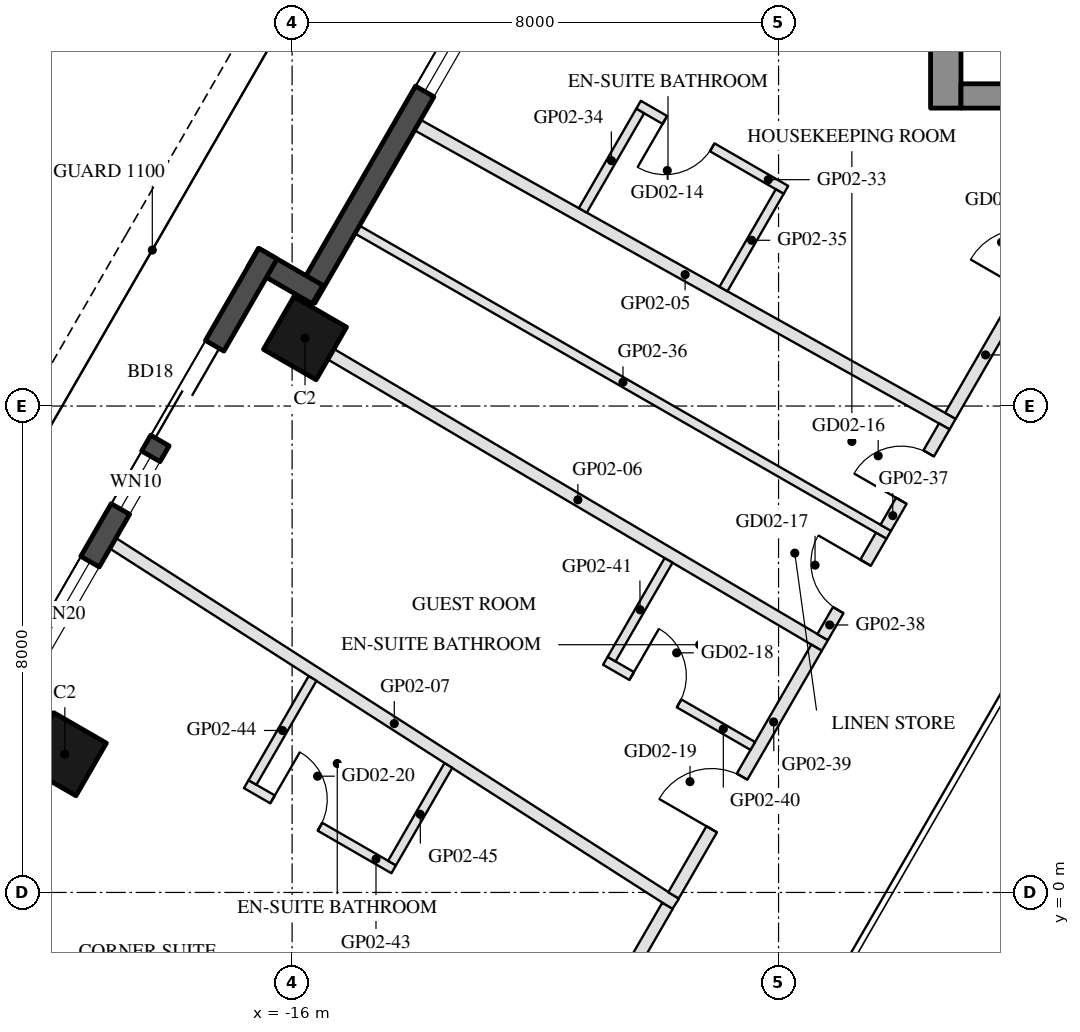
"""IFC4 building model, lengths in metres.
Left out: names, types, materials, properties, quantities, classifications, styles, units other than length and angle.
Written with IfcOpenShell. Run it as: python <this file> out.ifc"""

import sys

from ifc_helpers import new_model, si_unit, direction, frame, frame_2d, origin, origin_2d, place, context, subcontext, project, spatial, rectangle, hollow_rectangle, extrude, element, fill, save


model = new_model("IFC4")
c1 = context("Model", 3, precision=1e-05, world=origin(), true_north=direction((0.0, 1.0)))
c2 = subcontext(c1, "Body", "Model", "MODEL_VIEW")
j1 = project(units=[si_unit("LENGTHUNIT", "METRE"), si_unit("PLANEANGLEUNIT", "RADIAN")], contexts=[c1])
p1 = place(None, origin())
s1 = spatial("IfcSite", under=j1, at=p1, CompositionType="ELEMENT")
p2 = place(p1, origin())
s2 = spatial("IfcBuilding", under=s1, at=p2, CompositionType="ELEMENT")
p3 = place(p2, frame((0.0, 0.0, 53.9)))
s3 = spatial("IfcBuildingStorey", under=s2, at=p3, CompositionType="ELEMENT", Elevation=53.9)
for number, where, z_axis, x_axis in (
    (1, (-15.788, 9.115, 0.0), (0.0, 0.0, 1.0), (0.5, 0.866, 0.0)),
    (2, (-19.738, 2.273, 0.0), (0.0, 0.0, 1.0), (0.5, 0.866, 0.0)),
):
    element("IfcColumn", number, at=place(p3, frame(where, z_axis=z_axis, x_axis=x_axis)), inside=s3, PredefinedType="COLUMN", context=c2, shape_type="SweptSolid", body=[
        extrude(hollow_rectangle(XDim=1.0, YDim=1.0, WallThickness=0.045, at=origin_2d()), origin(), (0.0, 0.0, 1.0), 3.7),
    ])
p4 = place(p3, frame((-12.409, 15.617, 0.0), z_axis=(0.0, 0.0, 1.0), x_axis=(-0.500003597184, -0.866023326939, 0.0)))
e3 = element("IfcWall", 3, at=p4, inside=s3, PredefinedType="SOLIDWALL", context=c2, shape_type="SweptSolid", body=[
    extrude(rectangle(XDim=6.74, YDim=0.35, at=frame_2d((3.37, 0.0))), origin(), (0.0, 0.0, 1.0), 3.55),
])
p5 = place(p4, frame((0.32, 0.0, 0.3)))
e4 = element("IfcOpeningElement", 4, at=p5, cuts=e3, PredefinedType="OPENING", context=c2, shape_type="SweptSolid", body=[
    extrude(rectangle(XDim=2.5, YDim=2.65, at=frame_2d((1.25, 1.325))), frame((0.0, 0.185, 0.0), z_axis=(0.0, -1.0, 0.0), x_axis=(1.0, 0.0, 0.0)), (0.0, 0.0, 1.0), 0.37),
])
p6 = place(p3, frame((-15.581, 9.833, 0.0), z_axis=(0.0, 0.0, 1.0), x_axis=(-0.866055662726, 0.499947586314, 0.0)))
e5 = element("IfcWall", 5, at=p6, inside=s3, PredefinedType="SOLIDWALL", context=c2, shape_type="SweptSolid", body=[
    extrude(rectangle(XDim=1.22, YDim=0.35, at=frame_2d((0.61, 0.0))), origin(), (0.0, 0.0, 1.0), 3.55),
])
p7 = place(p3, frame((-16.398, 10.507, 0.0), z_axis=(0.0, 0.0, 1.0), x_axis=(-0.499999142773, -0.866025898704, 0.0)))
e6 = element("IfcWall", 6, at=p7, inside=s3, PredefinedType="SOLIDWALL", context=c2, shape_type="SweptSolid", body=[
    extrude(rectangle(XDim=9.7, YDim=0.35, at=frame_2d((4.85, 0.0))), origin(), (0.0, 0.0, 1.0), 3.55),
])
p8 = place(p7, frame((1.75, 0.0, 0.0)))
e7 = element("IfcOpeningElement", 7, at=p8, cuts=e6, PredefinedType="OPENING", context=c2, shape_type="SweptSolid", body=[
    extrude(rectangle(XDim=1.8, YDim=2.4, at=frame_2d((0.9, 1.2))), frame((0.0, 0.185, 0.0), z_axis=(0.0, -1.0, 0.0), x_axis=(1.0, 0.0, 0.0)), (0.0, 0.0, 1.0), 0.37),
])
p9 = place(p7, frame((3.85, 0.0, 0.3)))
e8 = element("IfcOpeningElement", 8, at=p9, cuts=e6, PredefinedType="OPENING", context=c2, shape_type="SweptSolid", body=[
    extrude(rectangle(XDim=1.0, YDim=2.65, at=frame_2d((0.5, 1.325))), frame((0.0, 0.185, 0.0), z_axis=(0.0, -1.0, 0.0), x_axis=(1.0, 0.0, 0.0)), (0.0, 0.0, 1.0), 0.37),
])
p10 = place(p7, frame((5.85, 0.0, 0.3)))
e9 = element("IfcOpeningElement", 9, at=p10, cuts=e6, PredefinedType="OPENING", context=c2, shape_type="SweptSolid", body=[
    extrude(rectangle(XDim=2.0, YDim=2.65, at=frame_2d((1.0, 1.325))), frame((0.0, 0.185, 0.0), z_axis=(0.0, -1.0, 0.0), x_axis=(1.0, 0.0, 0.0)), (0.0, 0.0, 1.0), 0.37),
])
p11 = place(p3, frame((-5.25, 12.9, 0.0), z_axis=(0.0, 0.0, 1.0), x_axis=(0.0, 1.0, 0.0)))
e10 = element("IfcWall", 10, at=p11, inside=s3, PredefinedType="SHEAR", context=c2, shape_type="SweptSolid", body=[
    extrude(rectangle(XDim=14.837, YDim=0.5, at=frame_2d((7.418, 0.0))), origin(), (0.0, 0.0, 1.0), 3.5),
])
p12 = place(p3, frame((5.0, 13.1, 0.0), z_axis=(0.0, 0.0, 1.0), x_axis=(-1.0, 0.0, 0.0)))
e11 = element("IfcWall", 11, at=p12, inside=s3, PredefinedType="SHEAR", context=c2, shape_type="SweptSolid", body=[
    extrude(rectangle(XDim=10.0, YDim=0.4, at=frame_2d((5.0, 0.0))), origin(), (0.0, 0.0, 1.0), 3.5),
])
p13 = place(p12, frame((3.55, 0.0, 0.0)))
e12 = element("IfcOpeningElement", 12, at=p13, cuts=e11, PredefinedType="OPENING", context=c2, shape_type="SweptSolid", body=[
    extrude(rectangle(XDim=1.1, YDim=2.1, at=frame_2d((0.55, 1.05))), frame((0.0, 0.21, 0.0), z_axis=(0.0, -1.0, 0.0), x_axis=(1.0, 0.0, 0.0)), (0.0, 0.0, 1.0), 0.42),
])
p14 = place(p12, frame((5.85, 0.0, 0.0)))
e13 = element("IfcOpeningElement", 13, at=p14, cuts=e11, PredefinedType="OPENING", context=c2, shape_type="SweptSolid", body=[
    extrude(rectangle(XDim=1.4, YDim=2.1, at=frame_2d((0.7, 1.05))), frame((0.0, 0.21, 0.0), z_axis=(0.0, -1.0, 0.0), x_axis=(1.0, 0.0, 0.0)), (0.0, 0.0, 1.0), 0.42),
])
p15 = place(p3, frame((-13.936, 12.622, 0.0), z_axis=(0.0, 0.0, 1.0), x_axis=(0.872898889426, -0.487901146585, 0.0)))
e14 = element("IfcWall", 14, at=p15, inside=s3, PredefinedType="PARTITIONING", context=c2, shape_type="SweptSolid", body=[
    extrude(rectangle(XDim=10.081, YDim=0.2, at=frame_2d((5.041, 0.0))), origin(), (0.0, 0.0, 1.0), 2.95),
])
p16 = place(p3, frame((-15.362, 8.853, 0.0), z_axis=(0.0, 0.0, 1.0), x_axis=(0.861347313363, -0.508016540835, 0.0)))
e15 = element("IfcWall", 15, at=p16, inside=s3, PredefinedType="PARTITIONING", context=c2, shape_type="SweptSolid", body=[
    extrude(rectangle(XDim=9.43, YDim=0.2, at=frame_2d((4.715, 0.0))), origin(), (0.0, 0.0, 1.0), 2.95),
])
p17 = place(p3, frame((-18.947, 5.743, 0.0), z_axis=(0.0, 0.0, 1.0), x_axis=(0.84192674528, -0.539591841657, 0.0)))
e16 = element("IfcWall", 16, at=p17, inside=s3, PredefinedType="PARTITIONING", context=c2, shape_type="SweptSolid", body=[
    extrude(rectangle(XDim=10.992, YDim=0.2, at=frame_2d((5.496, 0.0))), origin(), (0.0, 0.0, 1.0), 2.96),
])
p18 = place(p3, frame((-5.174, 7.838, 0.0), z_axis=(0.0, 0.0, 1.0), x_axis=(0.499973220989, 0.866040864101, 0.0)))
e17 = element("IfcWall", 17, at=p18, inside=s3, PredefinedType="PARTITIONING", context=c2, shape_type="SweptSolid", body=[
    extrude(rectangle(XDim=5.787, YDim=0.2, at=frame_2d((2.894, 0.0))), origin(), (0.0, 0.0, 1.0), 2.95),
])
p19 = place(p18, frame((2.393, 0.0, 0.0)))
e18 = element("IfcOpeningElement", 18, at=p19, cuts=e17, PredefinedType="OPENING", context=c2, shape_type="SweptSolid", body=[
    extrude(rectangle(XDim=1.0, YDim=2.1, at=frame_2d((0.5, 1.05))), frame((0.0, 0.11, 0.0), z_axis=(0.0, -1.0, 0.0), x_axis=(1.0, 0.0, 0.0)), (0.0, 0.0, 1.0), 0.22),
])
p20 = place(p3, frame((-7.878, 11.555, 0.0), z_axis=(0.0, 0.0, 1.0), x_axis=(-0.865996816683, 0.500049511043, 0.0)))
e19 = element("IfcWall", 19, at=p20, inside=s3, PredefinedType="PARTITIONING", context=c2, shape_type="SweptSolid", body=[
    extrude(rectangle(XDim=2.8, YDim=0.15, at=frame_2d((1.4, 0.0))), origin(), (0.0, 0.0, 1.0), 3.55),
])
p21 = place(p20, frame((1.4, 0.0, 0.0)))
e20 = element("IfcOpeningElement", 20, at=p21, cuts=e19, PredefinedType="OPENING", context=c2, shape_type="SweptSolid", body=[
    extrude(rectangle(XDim=0.9, YDim=2.1, at=frame_2d((0.45, 1.05))), frame((0.0, 0.085, 0.0), z_axis=(0.0, -1.0, 0.0), x_axis=(1.0, 0.0, 0.0)), (0.0, 0.0, 1.0), 0.17),
])
p22 = place(p3, frame((-10.275, 12.853, 0.0), z_axis=(0.0, 0.0, 1.0), x_axis=(-0.499950073403, -0.866054227, 0.0)))
e21 = element("IfcWall", 21, at=p22, inside=s3, PredefinedType="PARTITIONING", context=c2, shape_type="SweptSolid", body=[
    extrude(rectangle(XDim=1.888, YDim=0.15, at=frame_2d((0.944, 0.0))), origin(), (0.0, 0.0, 1.0), 3.55),
])
p23 = place(p3, frame((-7.98, 11.528, 0.0), z_axis=(0.0, 0.0, 1.0), x_axis=(-0.500011685716, -0.866018656928, 0.0)))
e22 = element("IfcWall", 22, at=p23, inside=s3, PredefinedType="PARTITIONING", context=c2, shape_type="SweptSolid", body=[
    extrude(rectangle(XDim=1.851, YDim=0.15, at=frame_2d((0.926, 0.0))), origin(), (0.0, 0.0, 1.0), 3.55),
])
p24 = place(p3, frame((-14.929, 10.902, 0.0), z_axis=(0.0, 0.0, 1.0), x_axis=(0.867191892367, -0.497974117614, 0.0)))
e23 = element("IfcWall", 23, at=p24, inside=s3, PredefinedType="PARTITIONING", context=c2, shape_type="SweptSolid", body=[
    extrude(rectangle(XDim=10.08, YDim=0.15, at=frame_2d((5.04, 0.0))), origin(), (0.0, 0.0, 1.0), 2.96),
])
p25 = place(p3, frame((-6.237, 5.997, 0.0), z_axis=(0.0, 0.0, 1.0), x_axis=(0.500051616692, 0.865995600822, 0.0)))
e24 = element("IfcWall", 24, at=p25, inside=s3, PredefinedType="PARTITIONING", context=c2, shape_type="SweptSolid", body=[
    extrude(rectangle(XDim=1.926, YDim=0.2, at=frame_2d((0.963, 0.0))), origin(), (0.0, 0.0, 1.0), 2.95),
])
p26 = place(p25, frame((0.513, 0.0, 0.0)))
e25 = element("IfcOpeningElement", 25, at=p26, cuts=e24, PredefinedType="OPENING", context=c2, shape_type="SweptSolid", body=[
    extrude(rectangle(XDim=0.9, YDim=2.1, at=frame_2d((0.45, 1.05))), frame((0.0, 0.11, 0.0), z_axis=(0.0, -1.0, 0.0), x_axis=(1.0, 0.0, 0.0)), (0.0, 0.0, 1.0), 0.22),
])
p27 = place(p3, frame((-7.275, 4.199, 0.0), z_axis=(0.0, 0.0, 1.0), x_axis=(0.500051616692, 0.865995600822, 0.0)))
e26 = element("IfcWall", 26, at=p27, inside=s3, PredefinedType="PARTITIONING", context=c2, shape_type="SweptSolid", body=[
    extrude(rectangle(XDim=1.926, YDim=0.2, at=frame_2d((0.963, 0.0))), origin(), (0.0, 0.0, 1.0), 2.95),
])
p28 = place(p27, frame((0.513, 0.0, 0.0)))
e27 = element("IfcOpeningElement", 27, at=p28, cuts=e26, PredefinedType="OPENING", context=c2, shape_type="SweptSolid", body=[
    extrude(rectangle(XDim=0.9, YDim=2.1, at=frame_2d((0.45, 1.05))), frame((0.0, 0.11, 0.0), z_axis=(0.0, -1.0, 0.0), x_axis=(1.0, 0.0, 0.0)), (0.0, 0.0, 1.0), 0.22),
])
p29 = place(p3, frame((-9.727, -0.047, 0.0), z_axis=(0.0, 0.0, 1.0), x_axis=(0.500019002036, 0.866014432676, 0.0)))
e28 = element("IfcWall", 28, at=p29, inside=s3, PredefinedType="PARTITIONING", context=c2, shape_type="SweptSolid", body=[
    extrude(rectangle(XDim=4.703, YDim=0.2, at=frame_2d((2.352, 0.0))), origin(), (0.0, 0.0, 1.0), 2.95),
])
p30 = place(p29, frame((1.254, 0.0, 0.0)))
e29 = element("IfcOpeningElement", 29, at=p30, cuts=e28, PredefinedType="OPENING", context=c2, shape_type="SweptSolid", body=[
    extrude(rectangle(XDim=1.0, YDim=2.1, at=frame_2d((0.5, 1.05))), frame((0.0, 0.11, 0.0), z_axis=(0.0, -1.0, 0.0), x_axis=(1.0, 0.0, 0.0)), (0.0, 0.0, 1.0), 0.22),
])
p31 = place(p3, frame((-10.849, 3.81, 0.0), z_axis=(0.0, 0.0, 1.0), x_axis=(0.866018616679, -0.500011755427, 0.0)))
e30 = element("IfcWall", 30, at=p31, inside=s3, PredefinedType="PARTITIONING", context=c2, shape_type="SweptSolid", body=[
    extrude(rectangle(XDim=2.8, YDim=0.15, at=frame_2d((1.4, 0.0))), origin(), (0.0, 0.0, 1.0), 3.55),
])
p32 = place(p31, frame((0.5, 0.0, 0.0)))
e31 = element("IfcOpeningElement", 31, at=p32, cuts=e30, PredefinedType="OPENING", context=c2, shape_type="SweptSolid", body=[
    extrude(rectangle(XDim=0.9, YDim=2.1, at=frame_2d((0.45, 1.05))), frame((0.0, 0.085, 0.0), z_axis=(0.0, -1.0, 0.0), x_axis=(1.0, 0.0, 0.0)), (0.0, 0.0, 1.0), 0.17),
])
p33 = place(p3, frame((-9.809, 5.461, 0.0), z_axis=(0.0, 0.0, 1.0), x_axis=(-0.499947857008, -0.866055506462, 0.0)))
e32 = element("IfcWall", 32, at=p33, inside=s3, PredefinedType="PARTITIONING", context=c2, shape_type="SweptSolid", body=[
    extrude(rectangle(XDim=1.875, YDim=0.15, at=frame_2d((0.938, 0.0))), origin(), (0.0, 0.0, 1.0), 3.55),
])
p34 = place(p3, frame((-12.269, -4.45, 0.0), z_axis=(0.0, 0.0, 1.0), x_axis=(0.500021044785, 0.866013253231, 0.0)))
e33 = element("IfcWall", 33, at=p34, inside=s3, PredefinedType="PARTITIONING", context=c2, shape_type="SweptSolid", body=[
    extrude(rectangle(XDim=4.884, YDim=0.2, at=frame_2d((2.442, 0.0))), origin(), (0.0, 0.0, 1.0), 2.95),
])
p35 = place(p34, frame((1.942, 0.0, 0.0)))
e34 = element("IfcOpeningElement", 34, at=p35, cuts=e33, PredefinedType="OPENING", context=c2, shape_type="SweptSolid", body=[
    extrude(rectangle(XDim=1.0, YDim=2.1, at=frame_2d((0.5, 1.05))), frame((0.0, 0.11, 0.0), z_axis=(0.0, -1.0, 0.0), x_axis=(1.0, 0.0, 0.0)), (0.0, 0.0, 1.0), 0.22),
])
p36 = place(p3, frame((-16.754, 1.781, 0.0), z_axis=(0.0, 0.0, 1.0), x_axis=(0.866056369097, -0.49994636267, 0.0)))
e35 = element("IfcWall", 35, at=p36, inside=s3, PredefinedType="PARTITIONING", context=c2, shape_type="SweptSolid", body=[
    extrude(rectangle(XDim=2.8, YDim=0.15, at=frame_2d((1.4, 0.0))), origin(), (0.0, 0.0, 1.0), 3.55),
])
p37 = place(p36, frame((0.5, 0.0, 0.0)))
e36 = element("IfcOpeningElement", 36, at=p37, cuts=e35, PredefinedType="OPENING", context=c2, shape_type="SweptSolid", body=[
    extrude(rectangle(XDim=0.9, YDim=2.1, at=frame_2d((0.45, 1.05))), frame((0.0, 0.085, 0.0), z_axis=(0.0, -1.0, 0.0), x_axis=(1.0, 0.0, 0.0)), (0.0, 0.0, 1.0), 0.17),
])
p38 = place(p3, frame((-15.664, 3.52, 0.0), z_axis=(0.0, 0.0, 1.0), x_axis=(-0.500018274647, -0.866014852655, 0.0)))
e37 = element("IfcWall", 37, at=p38, inside=s3, PredefinedType="PARTITIONING", context=c2, shape_type="SweptSolid", body=[
    extrude(rectangle(XDim=1.977, YDim=0.15, at=frame_2d((0.988, 0.0))), origin(), (0.0, 0.0, 1.0), 3.55),
])
p39 = place(p3, frame((-13.43, 2.088, 0.0), z_axis=(0.0, 0.0, 1.0), x_axis=(-0.499893495202, -0.866086885627, 0.0)))
e38 = element("IfcWall", 38, at=p39, inside=s3, PredefinedType="PARTITIONING", context=c2, shape_type="SweptSolid", body=[
    extrude(rectangle(XDim=1.854, YDim=0.15, at=frame_2d((0.927, 0.0))), origin(), (0.0, 0.0, 1.0), 3.55),
])
p40 = place(p5, origin())
e39 = element("IfcWindow", 39, at=p40, inside=s3, PartitioningType="SINGLE_PANEL", PredefinedType="WINDOW", context=c2, shape_type="SweptSolid", body=[
    extrude(rectangle(XDim=2.5, YDim=2.65, at=frame_2d((1.25, 1.325))), frame((0.0, 0.03, 0.0), z_axis=(0.0, -1.0, 0.0), x_axis=(1.0, 0.0, 0.0)), (0.0, 0.0, 1.0), 0.06),
])
fill(e4, e39)
p41 = place(p8, frame((1.8, 0.0, 0.0), z_axis=(0.0, 0.0, 1.0), x_axis=(-1.0, 0.0, 0.0)))
e40 = element("IfcDoor", 40, at=p41, inside=s3, OperationType="SLIDING_TO_LEFT", PredefinedType="DOOR", context=c2, shape_type="SweptSolid", body=[
    extrude(rectangle(XDim=1.8, YDim=2.4, at=frame_2d((0.9, 1.2))), frame((0.0, 0.025, 0.0), z_axis=(0.0, -1.0, 0.0), x_axis=(1.0, 0.0, 0.0)), (0.0, 0.0, 1.0), 0.05),
])
fill(e7, e40)
p42 = place(p9, origin())
e41 = element("IfcWindow", 41, at=p42, inside=s3, PartitioningType="SINGLE_PANEL", PredefinedType="WINDOW", context=c2, shape_type="SweptSolid", body=[
    extrude(rectangle(XDim=1.0, YDim=2.65, at=frame_2d((0.5, 1.325))), frame((0.0, 0.03, 0.0), z_axis=(0.0, -1.0, 0.0), x_axis=(1.0, 0.0, 0.0)), (0.0, 0.0, 1.0), 0.06),
])
fill(e8, e41)
p43 = place(p10, origin())
e42 = element("IfcWindow", 42, at=p43, inside=s3, PartitioningType="SINGLE_PANEL", PredefinedType="WINDOW", context=c2, shape_type="SweptSolid", body=[
    extrude(rectangle(XDim=2.0, YDim=2.65, at=frame_2d((1.0, 1.325))), frame((0.0, 0.03, 0.0), z_axis=(0.0, -1.0, 0.0), x_axis=(1.0, 0.0, 0.0)), (0.0, 0.0, 1.0), 0.06),
])
fill(e9, e42)
p44 = place(p21, origin())
e43 = element("IfcDoor", 43, at=p44, inside=s3, OperationType="SINGLE_SWING_RIGHT", PredefinedType="DOOR", context=c2, shape_type="SweptSolid", body=[
    extrude(rectangle(XDim=0.9, YDim=2.1, at=frame_2d((0.45, 1.05))), frame((0.0, 0.025, 0.0), z_axis=(0.0, -1.0, 0.0), x_axis=(1.0, 0.0, 0.0)), (0.0, 0.0, 1.0), 0.05),
])
fill(e20, e43)
p45 = place(p26, origin())
e44 = element("IfcDoor", 44, at=p45, inside=s3, OperationType="SINGLE_SWING_LEFT", PredefinedType="DOOR", context=c2, shape_type="SweptSolid", body=[
    extrude(rectangle(XDim=0.9, YDim=2.1, at=frame_2d((0.45, 1.05))), frame((0.0, 0.025, 0.0), z_axis=(0.0, -1.0, 0.0), x_axis=(1.0, 0.0, 0.0)), (0.0, 0.0, 1.0), 0.05),
])
fill(e25, e44)
p46 = place(p28, origin())
e45 = element("IfcDoor", 45, at=p46, inside=s3, OperationType="SINGLE_SWING_RIGHT", PredefinedType="DOOR", context=c2, shape_type="SweptSolid", body=[
    extrude(rectangle(XDim=0.9, YDim=2.1, at=frame_2d((0.45, 1.05))), frame((0.0, 0.025, 0.0), z_axis=(0.0, -1.0, 0.0), x_axis=(1.0, 0.0, 0.0)), (0.0, 0.0, 1.0), 0.05),
])
fill(e27, e45)
p47 = place(p32, origin())
e46 = element("IfcDoor", 46, at=p47, inside=s3, OperationType="SINGLE_SWING_LEFT", PredefinedType="DOOR", context=c2, shape_type="SweptSolid", body=[
    extrude(rectangle(XDim=0.9, YDim=2.1, at=frame_2d((0.45, 1.05))), frame((0.0, 0.025, 0.0), z_axis=(0.0, -1.0, 0.0), x_axis=(1.0, 0.0, 0.0)), (0.0, 0.0, 1.0), 0.05),
])
fill(e31, e46)
p48 = place(p30, origin())
e47 = element("IfcDoor", 47, at=p48, inside=s3, OperationType="SINGLE_SWING_LEFT", PredefinedType="DOOR", context=c2, shape_type="SweptSolid", body=[
    extrude(rectangle(XDim=1.0, YDim=2.1, at=frame_2d((0.5, 1.05))), frame((0.0, 0.025, 0.0), z_axis=(0.0, -1.0, 0.0), x_axis=(1.0, 0.0, 0.0)), (0.0, 0.0, 1.0), 0.05),
])
fill(e29, e47)
p49 = place(p37, origin())
e48 = element("IfcDoor", 48, at=p49, inside=s3, OperationType="SINGLE_SWING_LEFT", PredefinedType="DOOR", context=c2, shape_type="SweptSolid", body=[
    extrude(rectangle(XDim=0.9, YDim=2.1, at=frame_2d((0.45, 1.05))), frame((0.0, 0.025, 0.0), z_axis=(0.0, -1.0, 0.0), x_axis=(1.0, 0.0, 0.0)), (0.0, 0.0, 1.0), 0.05),
])
fill(e36, e48)
save(model, sys.argv[1])
